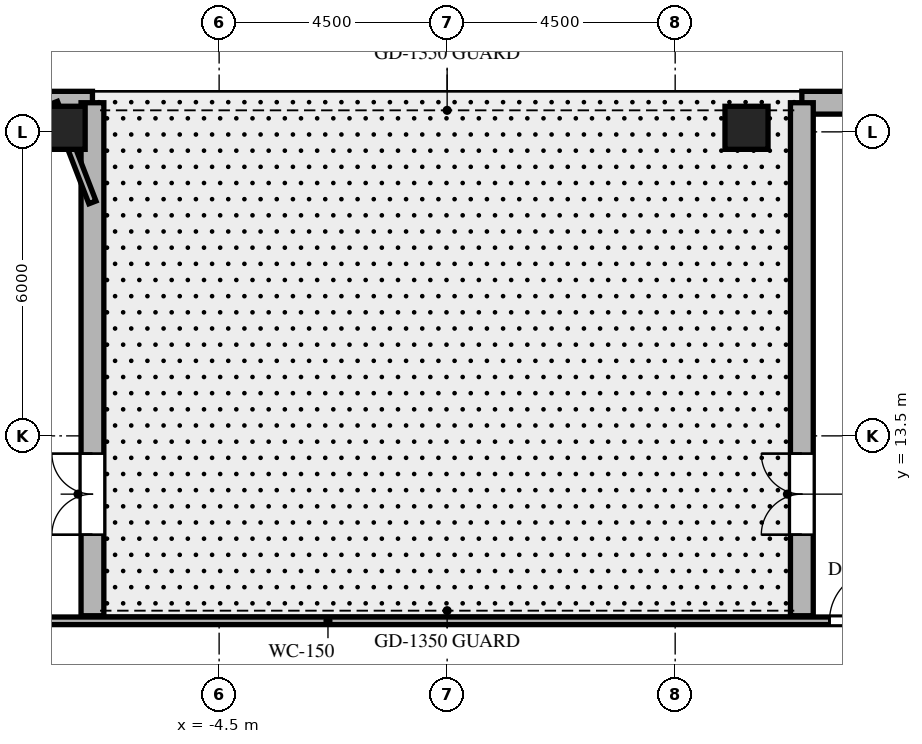
"""IFC4 building model, lengths in metres.
Left out: names, types, materials, properties, quantities, classifications, styles, units other than length and angle.
Written with IfcOpenShell. Run it as: python <this file> out.ifc"""

import sys

from ifc_helpers import new_model, si_unit, direction, frame, frame_2d, origin, origin_2d, place, context, subcontext, project, spatial, rectangle, extrude, element, fill, save


model = new_model("IFC4")
c1 = context("Model", 3, precision=1e-05, world=origin(), true_north=direction((0.0, 1.0)))
c2 = subcontext(c1, "Body", "Model", "MODEL_VIEW")
j1 = project(units=[si_unit("LENGTHUNIT", "METRE"), si_unit("PLANEANGLEUNIT", "RADIAN")], contexts=[c1])
p1 = place(None, origin())
s1 = spatial("IfcSite", under=j1, at=p1, CompositionType="ELEMENT")
p2 = place(p1, origin())
s2 = spatial("IfcBuilding", under=s1, at=p2, CompositionType="ELEMENT")
p3 = place(p2, frame((0.0, 0.0, 288.6)))
s3 = spatial("IfcBuildingStorey", under=s2, at=p3, CompositionType="ELEMENT", Elevation=288.6)
for number, where, z_axis, x_axis in (
    (1, (5.908, 19.58, 0.0), (0.0, 0.0, 1.0), (1.0, 0.0, 0.0)),
    (2, (-7.569, 19.58, 0.0), (0.0, 0.0, 1.0), (1.0, 0.0, 0.0)),
):
    element("IfcColumn", number, at=place(p3, frame(where, z_axis=z_axis, x_axis=x_axis)), inside=s3, PredefinedType="COLUMN", context=c2, shape_type="SweptSolid", body=[
        extrude(rectangle(XDim=0.85, YDim=0.85, at=origin_2d()), origin(), (0.0, 0.0, 1.0), 4.5),
    ])
p4 = place(p3, frame((10.379, 20.075, 0.0), z_axis=(0.0, 0.0, 1.0), x_axis=(-1.0, 0.0, 0.0)))
e3 = element("IfcWall", 3, at=p4, inside=s3, PredefinedType="SOLIDWALL", context=c2, shape_type="SweptSolid", body=[
    extrude(rectangle(XDim=3.379, YDim=0.45, at=frame_2d((1.689, 0.0))), origin(), (0.0, 0.0, 1.0), 4.18),
])
p5 = place(p3, frame((-7.0, 20.075, 0.0), z_axis=(0.0, 0.0, 1.0), x_axis=(-1.0, 0.0, 0.0)))
e4 = element("IfcWall", 4, at=p5, inside=s3, PredefinedType="SOLIDWALL", context=c2, shape_type="SweptSolid", body=[
    extrude(rectangle(XDim=5.038, YDim=0.45, at=frame_2d((2.519, 0.0))), origin(), (0.0, 0.0, 1.0), 4.18),
])
p6 = place(p3, frame((-7.0, 9.95, 0.0), z_axis=(0.0, 0.0, 1.0), x_axis=(0.0, 1.0, 0.0)))
e5 = element("IfcWall", 5, at=p6, inside=s3, PredefinedType="SOLIDWALL", context=c2, shape_type="SweptSolid", body=[
    extrude(rectangle(XDim=10.125, YDim=0.45, at=frame_2d((5.062, 0.0))), origin(), (0.0, 0.0, 1.0), 4.18),
])
p7 = place(p6, frame((1.6, 0.0, 0.0)))
e6 = element("IfcOpeningElement", 6, at=p7, cuts=e5, PredefinedType="OPENING", context=c2, shape_type="SweptSolid", body=[
    extrude(rectangle(XDim=1.6, YDim=2.25, at=frame_2d((0.8, 1.125))), frame((0.0, 0.235, 0.0), z_axis=(0.0, -1.0, 0.0), x_axis=(1.0, 0.0, 0.0)), (0.0, 0.0, 1.0), 0.47),
])
p8 = place(p3, frame((7.0, 9.95, 0.0), z_axis=(0.0, 0.0, 1.0), x_axis=(0.0, 1.0, 0.0)))
e7 = element("IfcWall", 7, at=p8, inside=s3, PredefinedType="SOLIDWALL", context=c2, shape_type="SweptSolid", body=[
    extrude(rectangle(XDim=10.125, YDim=0.45, at=frame_2d((5.062, 0.0))), origin(), (0.0, 0.0, 1.0), 4.18),
])
p9 = place(p8, frame((1.6, 0.0, 0.0)))
e8 = element("IfcOpeningElement", 8, at=p9, cuts=e7, PredefinedType="OPENING", context=c2, shape_type="SweptSolid", body=[
    extrude(rectangle(XDim=1.6, YDim=2.25, at=frame_2d((0.8, 1.125))), frame((0.0, 0.235, 0.0), z_axis=(0.0, -1.0, 0.0), x_axis=(1.0, 0.0, 0.0)), (0.0, 0.0, 1.0), 0.47),
])
p10 = place(p3, frame((-11.35, 9.85, 0.0), z_axis=(0.0, 0.0, 1.0), x_axis=(1.0, 0.0, 0.0)))
e9 = element("IfcWall", 9, at=p10, inside=s3, PredefinedType="PARTITIONING", context=c2, shape_type="SweptSolid", body=[
    extrude(rectangle(XDim=22.7, YDim=0.15, at=frame_2d((11.35, 0.0))), origin(), (0.0, 0.0, 1.0), 3.67),
])
p11 = place(p10, frame((18.896, 0.0, 0.0)))
e10 = element("IfcOpeningElement", 10, at=p11, cuts=e9, PredefinedType="OPENING", context=c2, shape_type="SweptSolid", body=[
    extrude(rectangle(XDim=1.0, YDim=2.03, at=frame_2d((0.5, 1.015))), frame((0.0, 0.085, 0.0), z_axis=(0.0, -1.0, 0.0), x_axis=(1.0, 0.0, 0.0)), (0.0, 0.0, 1.0), 0.17),
])
p12 = place(p3, frame((-7.0, 18.108, 0.0), z_axis=(0.0, 0.0, 1.0), x_axis=(-0.360646535801, 0.932702565781, 0.0)))
e11 = element("IfcWall", 11, at=p12, inside=s3, PredefinedType="PARTITIONING", context=c2, shape_type="SweptSolid", body=[
    extrude(rectangle(XDim=2.109, YDim=0.15, at=frame_2d((1.054, 0.0))), origin(), (0.0, 0.0, 1.0), 3.52),
])
p13 = place(p7, origin())
e12 = element("IfcDoor", 12, at=p13, inside=s3, OperationType="DOUBLE_SWING_LEFT", PredefinedType="DOOR", context=c2, shape_type="SweptSolid", body=[
    extrude(rectangle(XDim=1.6, YDim=2.25, at=frame_2d((0.8, 1.125))), frame((0.0, 0.025, 0.0), z_axis=(0.0, -1.0, 0.0), x_axis=(1.0, 0.0, 0.0)), (0.0, 0.0, 1.0), 0.05),
])
fill(e6, e12)
p14 = place(p9, origin())
e13 = element("IfcDoor", 13, at=p14, inside=s3, OperationType="DOUBLE_SWING_LEFT", PredefinedType="DOOR", context=c2, shape_type="SweptSolid", body=[
    extrude(rectangle(XDim=1.6, YDim=2.25, at=frame_2d((0.8, 1.125))), frame((0.0, 0.025, 0.0), z_axis=(0.0, -1.0, 0.0), x_axis=(1.0, 0.0, 0.0)), (0.0, 0.0, 1.0), 0.05),
])
fill(e8, e13)
p15 = place(p11, origin())
e14 = element("IfcDoor", 14, at=p15, inside=s3, OperationType="SINGLE_SWING_RIGHT", PredefinedType="DOOR", context=c2, shape_type="SweptSolid", body=[
    extrude(rectangle(XDim=1.0, YDim=2.03, at=frame_2d((0.5, 1.015))), frame((0.0, 0.025, 0.0), z_axis=(0.0, -1.0, 0.0), x_axis=(1.0, 0.0, 0.0)), (0.0, 0.0, 1.0), 0.05),
])
fill(e10, e14)
save(model, sys.argv[1])
